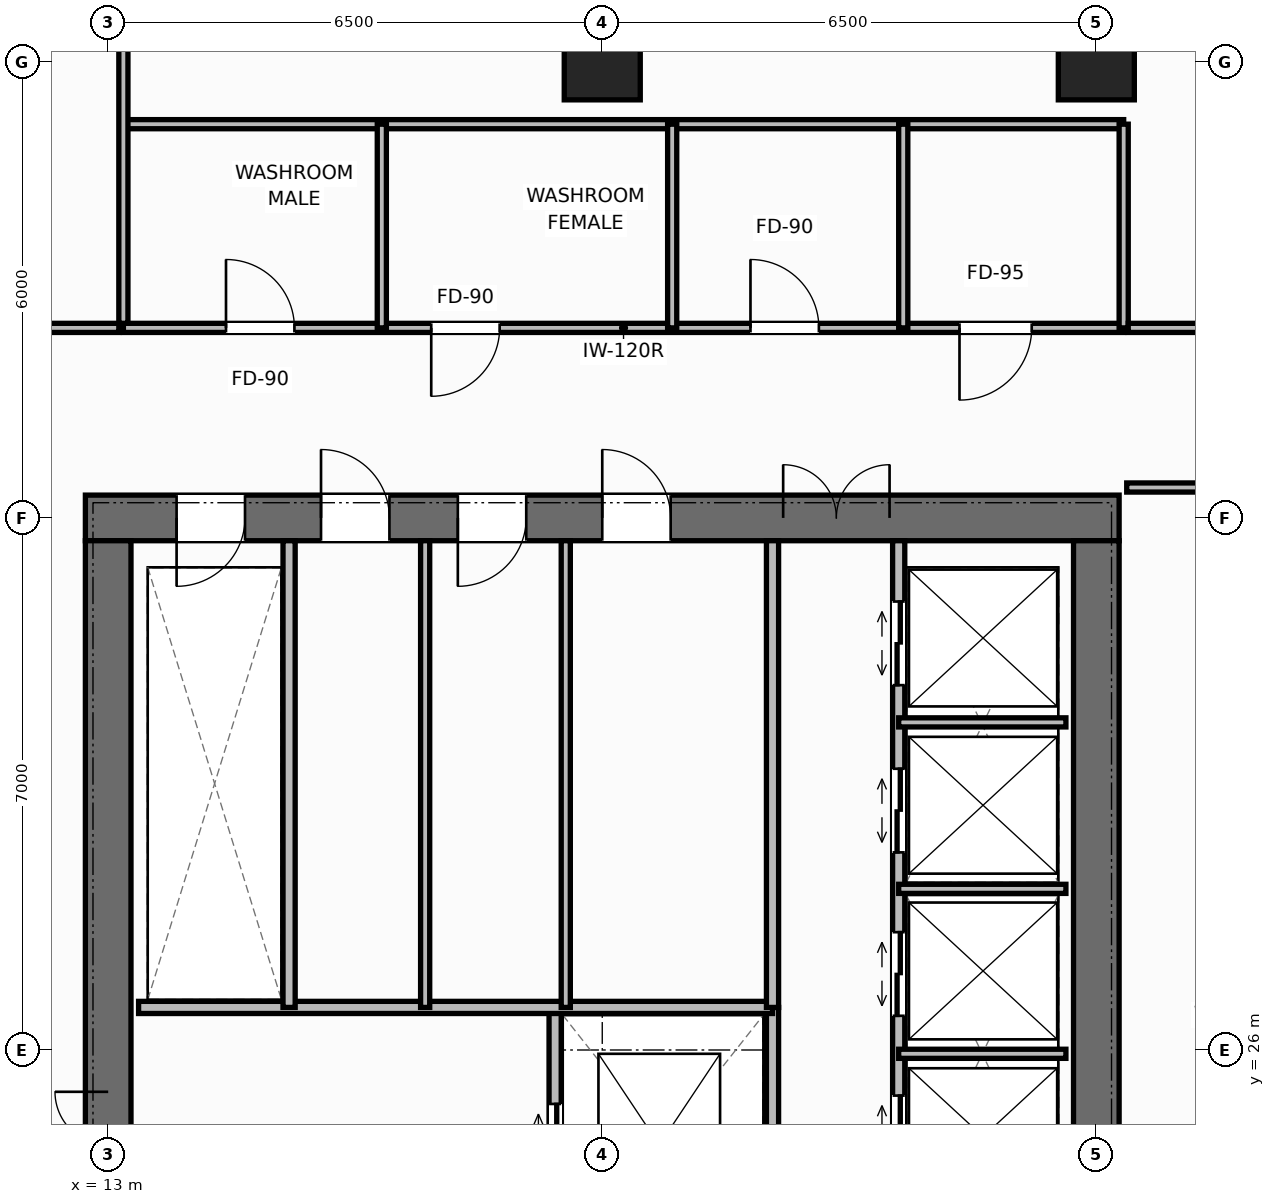
"""IFC4 building model, lengths in metres.
Left out: names, types, materials, properties, quantities, classifications, styles, units other than length and angle.
Written with IfcOpenShell. Run it as: python <this file> out.ifc"""

import sys

from ifc_helpers import new_model, si_unit, direction, frame, frame_2d, origin, origin_2d, place, context, subcontext, project, spatial, rectangle, extrude, element, fill, save


model = new_model("IFC4")
c1 = context("Model", 3, precision=1e-05, world=origin(), true_north=direction((0.0, 1.0)))
c2 = subcontext(c1, "Body", "Model", "MODEL_VIEW")
j1 = project(units=[si_unit("LENGTHUNIT", "METRE"), si_unit("PLANEANGLEUNIT", "RADIAN")], contexts=[c1])
p1 = place(None, origin())
s1 = spatial("IfcSite", under=j1, at=p1, CompositionType="ELEMENT")
p2 = place(p1, origin())
s2 = spatial("IfcBuilding", under=s1, at=p2, CompositionType="ELEMENT")
p3 = place(p2, frame((0.0, 0.0, 144.2)))
s3 = spatial("IfcBuildingStorey", under=s2, at=p3, CompositionType="ELEMENT", Elevation=144.2)
p4 = place(p3, frame((12.7, 33.0, 0.0), z_axis=(0.0, 0.0, 1.0), x_axis=(1.0, 0.0, 0.0)))
e1 = element("IfcWall", 1, at=p4, inside=s3, PredefinedType="SHEAR", context=c2, shape_type="SweptSolid", body=[
    extrude(rectangle(XDim=13.6, YDim=0.6, at=frame_2d((6.8, 0.0))), origin(), (0.0, 0.0, 1.0), 3.8),
])
p5 = place(p4, frame((1.2, 0.0, 0.0)))
e2 = element("IfcOpeningElement", 2, at=p5, cuts=e1, PredefinedType="OPENING", context=c2, shape_type="SweptSolid", body=[
    extrude(rectangle(XDim=0.9, YDim=2.15, at=frame_2d((0.45, 1.075))), frame((0.0, 0.31, 0.0), z_axis=(0.0, -1.0, 0.0), x_axis=(1.0, 0.0, 0.0)), (0.0, 0.0, 1.0), 0.62),
])
p6 = place(p4, frame((3.1, 0.0, 0.0)))
e3 = element("IfcOpeningElement", 3, at=p6, cuts=e1, PredefinedType="OPENING", context=c2, shape_type="SweptSolid", body=[
    extrude(rectangle(XDim=0.9, YDim=2.15, at=frame_2d((0.45, 1.075))), frame((0.0, 0.31, 0.0), z_axis=(0.0, -1.0, 0.0), x_axis=(1.0, 0.0, 0.0)), (0.0, 0.0, 1.0), 0.62),
])
p7 = place(p4, frame((4.9, 0.0, 0.0)))
e4 = element("IfcOpeningElement", 4, at=p7, cuts=e1, PredefinedType="OPENING", context=c2, shape_type="SweptSolid", body=[
    extrude(rectangle(XDim=0.9, YDim=2.15, at=frame_2d((0.45, 1.075))), frame((0.0, 0.31, 0.0), z_axis=(0.0, -1.0, 0.0), x_axis=(1.0, 0.0, 0.0)), (0.0, 0.0, 1.0), 0.62),
])
p8 = place(p4, frame((6.8, 0.0, 0.0)))
e5 = element("IfcOpeningElement", 5, at=p8, cuts=e1, PredefinedType="OPENING", context=c2, shape_type="SweptSolid", body=[
    extrude(rectangle(XDim=0.9, YDim=2.15, at=frame_2d((0.45, 1.075))), frame((0.0, 0.31, 0.0), z_axis=(0.0, -1.0, 0.0), x_axis=(1.0, 0.0, 0.0)), (0.0, 0.0, 1.0), 0.62),
])
p9 = place(p4, frame((9.18, 0.0, 0.0)))
e6 = element("IfcOpeningElement", 6, at=p9, cuts=e1, PredefinedType="OPENING", context=c2, shape_type="SweptSolid", body=[
    extrude(rectangle(XDim=1.4, YDim=2.2, at=frame_2d((0.7, 1.1))), frame((0.0, 0.31, 0.0), z_axis=(0.0, -1.0, 0.0), x_axis=(1.0, 0.0, 0.0)), (0.0, 0.0, 1.0), 0.62),
])
p10 = place(p3, frame((13.0, 19.3, 0.0), z_axis=(0.0, 0.0, 1.0), x_axis=(0.0, 1.0, 0.0)))
e7 = element("IfcWall", 7, at=p10, inside=s3, PredefinedType="SHEAR", context=c2, shape_type="SweptSolid", body=[
    extrude(rectangle(XDim=13.4, YDim=0.6, at=frame_2d((6.7, 0.0))), origin(), (0.0, 0.0, 1.0), 3.8),
])
p11 = place(p10, frame((4.75, 0.0, 0.0)))
e8 = element("IfcOpeningElement", 8, at=p11, cuts=e7, PredefinedType="OPENING", context=c2, shape_type="SweptSolid", body=[
    extrude(rectangle(XDim=1.4, YDim=2.2, at=frame_2d((0.7, 1.1))), frame((0.0, 0.31, 0.0), z_axis=(0.0, -1.0, 0.0), x_axis=(1.0, 0.0, 0.0)), (0.0, 0.0, 1.0), 0.62),
])
p12 = place(p3, frame((26.0, 19.3, 0.0), z_axis=(0.0, 0.0, 1.0), x_axis=(0.0, 1.0, 0.0)))
e9 = element("IfcWall", 9, at=p12, inside=s3, PredefinedType="SHEAR", context=c2, shape_type="SweptSolid", body=[
    extrude(rectangle(XDim=13.4, YDim=0.6, at=frame_2d((6.7, 0.0))), origin(), (0.0, 0.0, 1.0), 3.8),
])
for number, where, z_axis, x_axis in (
    (10, (19.5, 39.0, 0.0), (0.0, 0.0, 1.0), (1.0, 0.0, 0.0)),
    (11, (26.0, 39.0, 0.0), (0.0, 0.0, 1.0), (1.0, 0.0, 0.0)),
):
    element("IfcColumn", number, at=place(p3, frame(where, z_axis=z_axis, x_axis=x_axis)), inside=s3, PredefinedType="COLUMN", context=c2, shape_type="SweptSolid", body=[
        extrude(rectangle(XDim=1.0, YDim=1.0, at=origin_2d()), origin(), (0.0, 0.0, 1.0), 3.8),
    ])
p13 = place(p3, frame((21.74, 23.09, 0.0), z_axis=(0.0, 0.0, 1.0), x_axis=(0.0, 1.0, 0.0)))
e12 = element("IfcWall", 12, at=p13, inside=s3, PredefinedType="STANDARD", context=c2, shape_type="SweptSolid", body=[
    extrude(rectangle(XDim=3.47, YDim=0.16, at=frame_2d((1.735, 0.0))), origin(), (0.0, 0.0, 1.0), 3.572),
])
p14 = place(p3, frame((18.88, 23.09, 0.0), z_axis=(0.0, 0.0, 1.0), x_axis=(0.0, 1.0, 0.0)))
e13 = element("IfcWall", 13, at=p14, inside=s3, PredefinedType="STANDARD", context=c2, shape_type="SweptSolid", body=[
    extrude(rectangle(XDim=3.47, YDim=0.16, at=frame_2d((1.735, 0.0))), origin(), (0.0, 0.0, 1.0), 3.572),
])
p15 = place(p14, frame((1.1, 0.0, 0.0)))
e14 = element("IfcOpeningElement", 14, at=p15, cuts=e13, PredefinedType="OPENING", context=c2, shape_type="SweptSolid", body=[
    extrude(rectangle(XDim=1.1, YDim=2.2, at=frame_2d((0.55, 1.1))), frame((0.0, 0.09, 0.0), z_axis=(0.0, -1.0, 0.0), x_axis=(1.0, 0.0, 0.0)), (0.0, 0.0, 1.0), 0.18),
])
p16 = place(p3, frame((13.4, 26.56, 0.0), z_axis=(0.0, 0.0, 1.0), x_axis=(1.0, 0.0, 0.0)))
e15 = element("IfcWall", 15, at=p16, inside=s3, PredefinedType="STANDARD", context=c2, shape_type="SweptSolid", body=[
    extrude(rectangle(XDim=8.34, YDim=0.16, at=frame_2d((4.17, 0.0))), origin(), (0.0, 0.0, 1.0), 3.572),
])
p17 = place(p3, frame((15.38, 26.56, 0.0), z_axis=(0.0, 0.0, 1.0), x_axis=(0.0, 1.0, 0.0)))
e16 = element("IfcWall", 16, at=p17, inside=s3, PredefinedType="STANDARD", context=c2, shape_type="SweptSolid", body=[
    extrude(rectangle(XDim=6.14, YDim=0.16, at=frame_2d((3.07, 0.0))), origin(), (0.0, 0.0, 1.0), 3.572),
])
for number, where, z_axis, x_axis in (
    (17, (17.17, 26.56, 0.0), (0.0, 0.0, 1.0), (0.0, 1.0, 0.0)),
    (18, (19.02, 26.56, 0.0), (0.0, 0.0, 1.0), (0.0, 1.0, 0.0)),
):
    element("IfcWall", number, at=place(p3, frame(where, z_axis=z_axis, x_axis=x_axis)), inside=s3, PredefinedType="PARTITIONING", context=c2, shape_type="SweptSolid", body=[
        extrude(rectangle(XDim=6.14, YDim=0.12, at=frame_2d((3.07, 0.0))), origin(), (0.0, 0.0, 1.0), 3.572),
    ])
p18 = place(p3, frame((21.74, 26.56, 0.0), z_axis=(0.0, 0.0, 1.0), x_axis=(0.0, 1.0, 0.0)))
e19 = element("IfcWall", 19, at=p18, inside=s3, PredefinedType="STANDARD", context=c2, shape_type="SweptSolid", body=[
    extrude(rectangle(XDim=6.14, YDim=0.16, at=frame_2d((3.07, 0.0))), origin(), (0.0, 0.0, 1.0), 3.572),
])
p19 = place(p3, frame((23.4, 19.3, 0.0), z_axis=(0.0, 0.0, 1.0), x_axis=(0.0, 1.0, 0.0)))
e20 = element("IfcWall", 20, at=p19, inside=s3, PredefinedType="STANDARD", context=c2, shape_type="SweptSolid", body=[
    extrude(rectangle(XDim=13.4, YDim=0.16, at=frame_2d((6.7, 0.0))), origin(), (0.0, 0.0, 1.0), 3.572),
])
p20 = place(p19, frame((1.7, 0.0, 0.0)))
e21 = element("IfcOpeningElement", 21, at=p20, cuts=e20, PredefinedType="OPENING", context=c2, shape_type="SweptSolid", body=[
    extrude(rectangle(XDim=0.95, YDim=2.15, at=frame_2d((0.475, 1.075))), frame((0.0, 0.09, 0.0), z_axis=(0.0, -1.0, 0.0), x_axis=(1.0, 0.0, 0.0)), (0.0, 0.0, 1.0), 0.18),
])
p21 = place(p19, frame((5.0, 0.0, 0.0)))
e22 = element("IfcOpeningElement", 22, at=p21, cuts=e20, PredefinedType="OPENING", context=c2, shape_type="SweptSolid", body=[
    extrude(rectangle(XDim=1.1, YDim=2.2, at=frame_2d((0.55, 1.1))), frame((0.0, 0.09, 0.0), z_axis=(0.0, -1.0, 0.0), x_axis=(1.0, 0.0, 0.0)), (0.0, 0.0, 1.0), 0.18),
])
p22 = place(p19, frame((7.15, 0.0, 0.0)))
e23 = element("IfcOpeningElement", 23, at=p22, cuts=e20, PredefinedType="OPENING", context=c2, shape_type="SweptSolid", body=[
    extrude(rectangle(XDim=1.1, YDim=2.2, at=frame_2d((0.55, 1.1))), frame((0.0, 0.09, 0.0), z_axis=(0.0, -1.0, 0.0), x_axis=(1.0, 0.0, 0.0)), (0.0, 0.0, 1.0), 0.18),
])
p23 = place(p19, frame((9.3, 0.0, 0.0)))
e24 = element("IfcOpeningElement", 24, at=p23, cuts=e20, PredefinedType="OPENING", context=c2, shape_type="SweptSolid", body=[
    extrude(rectangle(XDim=1.1, YDim=2.2, at=frame_2d((0.55, 1.1))), frame((0.0, 0.09, 0.0), z_axis=(0.0, -1.0, 0.0), x_axis=(1.0, 0.0, 0.0)), (0.0, 0.0, 1.0), 0.18),
])
p24 = place(p19, frame((11.5, 0.0, 0.0)))
e25 = element("IfcOpeningElement", 25, at=p24, cuts=e20, PredefinedType="OPENING", context=c2, shape_type="SweptSolid", body=[
    extrude(rectangle(XDim=1.1, YDim=2.2, at=frame_2d((0.55, 1.1))), frame((0.0, 0.09, 0.0), z_axis=(0.0, -1.0, 0.0), x_axis=(1.0, 0.0, 0.0)), (0.0, 0.0, 1.0), 0.18),
])
for number, where, z_axis, x_axis in (
    (26, (23.4, 25.95, 0.0), (0.0, 0.0, 1.0), (1.0, 0.0, 0.0)),
    (27, (23.4, 28.12, 0.0), (0.0, 0.0, 1.0), (1.0, 0.0, 0.0)),
    (28, (23.4, 30.31, 0.0), (0.0, 0.0, 1.0), (1.0, 0.0, 0.0)),
):
    element("IfcWall", number, at=place(p3, frame(where, z_axis=z_axis, x_axis=x_axis)), inside=s3, PredefinedType="PARTITIONING", context=c2, shape_type="SweptSolid", body=[
        extrude(rectangle(XDim=2.2, YDim=0.12, at=frame_2d((1.1, 0.0))), origin(), (0.0, 0.0, 1.0), 3.572),
    ])
p25 = place(p3, frame((26.4, 33.4, 0.0), z_axis=(0.0, 0.0, 1.0), x_axis=(1.0, 0.0, 0.0)))
e29 = element("IfcWall", 29, at=p25, inside=s3, PredefinedType="PARTITIONING", context=c2, shape_type="SweptSolid", body=[
    extrude(rectangle(XDim=3.6, YDim=0.12, at=frame_2d((1.8, 0.0))), origin(), (0.0, 0.0, 1.0), 3.572),
])
p26 = place(p25, frame((1.1, 0.0, 0.0)))
e30 = element("IfcOpeningElement", 30, at=p26, cuts=e29, PredefinedType="OPENING", context=c2, shape_type="SweptSolid", body=[
    extrude(rectangle(XDim=0.95, YDim=2.15, at=frame_2d((0.475, 1.075))), frame((0.0, 0.07, 0.0), z_axis=(0.0, -1.0, 0.0), x_axis=(1.0, 0.0, 0.0)), (0.0, 0.0, 1.0), 0.14),
])
p27 = place(p3, frame((13.2, 35.5, 0.0), z_axis=(0.0, 0.0, 1.0), x_axis=(1.0, 0.0, 0.0)))
e31 = element("IfcWall", 31, at=p27, inside=s3, PredefinedType="PARTITIONING", context=c2, shape_type="SweptSolid", body=[
    extrude(rectangle(XDim=13.16, YDim=0.12, at=frame_2d((6.58, 0.0))), origin(), (0.0, 0.0, 1.0), 3.572),
])
p28 = place(p27, frame((1.35, 0.0, 0.0)))
e32 = element("IfcOpeningElement", 32, at=p28, cuts=e31, PredefinedType="OPENING", context=c2, shape_type="SweptSolid", body=[
    extrude(rectangle(XDim=0.9, YDim=2.15, at=frame_2d((0.45, 1.075))), frame((0.0, 0.07, 0.0), z_axis=(0.0, -1.0, 0.0), x_axis=(1.0, 0.0, 0.0)), (0.0, 0.0, 1.0), 0.14),
])
p29 = place(p27, frame((4.05, 0.0, 0.0)))
e33 = element("IfcOpeningElement", 33, at=p29, cuts=e31, PredefinedType="OPENING", context=c2, shape_type="SweptSolid", body=[
    extrude(rectangle(XDim=0.9, YDim=2.15, at=frame_2d((0.45, 1.075))), frame((0.0, 0.07, 0.0), z_axis=(0.0, -1.0, 0.0), x_axis=(1.0, 0.0, 0.0)), (0.0, 0.0, 1.0), 0.14),
])
p30 = place(p27, frame((8.25, 0.0, 0.0)))
e34 = element("IfcOpeningElement", 34, at=p30, cuts=e31, PredefinedType="OPENING", context=c2, shape_type="SweptSolid", body=[
    extrude(rectangle(XDim=0.9, YDim=2.15, at=frame_2d((0.45, 1.075))), frame((0.0, 0.07, 0.0), z_axis=(0.0, -1.0, 0.0), x_axis=(1.0, 0.0, 0.0)), (0.0, 0.0, 1.0), 0.14),
])
p31 = place(p27, frame((11.0, 0.0, 0.0)))
e35 = element("IfcOpeningElement", 35, at=p31, cuts=e31, PredefinedType="OPENING", context=c2, shape_type="SweptSolid", body=[
    extrude(rectangle(XDim=0.95, YDim=2.15, at=frame_2d((0.475, 1.075))), frame((0.0, 0.07, 0.0), z_axis=(0.0, -1.0, 0.0), x_axis=(1.0, 0.0, 0.0)), (0.0, 0.0, 1.0), 0.14),
])
p32 = place(p3, frame((13.2, 38.18, 0.0), z_axis=(0.0, 0.0, 1.0), x_axis=(1.0, 0.0, 0.0)))
e36 = element("IfcWall", 36, at=p32, inside=s3, PredefinedType="PARTITIONING", context=c2, shape_type="SweptSolid", body=[
    extrude(rectangle(XDim=13.16, YDim=0.12, at=frame_2d((6.58, 0.0))), origin(), (0.0, 0.0, 1.0), 3.572),
])
for number, where, z_axis, x_axis in (
    (37, (16.6, 35.5, 0.0), (0.0, 0.0, 1.0), (0.0, 1.0, 0.0)),
    (38, (20.42, 35.5, 0.0), (0.0, 0.0, 1.0), (0.0, 1.0, 0.0)),
    (39, (23.46, 35.5, 0.0), (0.0, 0.0, 1.0), (0.0, 1.0, 0.0)),
    (40, (26.36, 35.5, 0.0), (0.0, 0.0, 1.0), (0.0, 1.0, 0.0)),
):
    element("IfcWall", number, at=place(p3, frame(where, z_axis=z_axis, x_axis=x_axis)), inside=s3, PredefinedType="PARTITIONING", context=c2, shape_type="SweptSolid", body=[
        extrude(rectangle(XDim=2.68, YDim=0.12, at=frame_2d((1.34, 0.0))), origin(), (0.0, 0.0, 1.0), 3.572),
    ])
p33 = place(p3, frame((13.2, 35.56, 0.0), z_axis=(0.0, 0.0, 1.0), x_axis=(0.0, 1.0, 0.0)))
e41 = element("IfcWall", 41, at=p33, inside=s3, PredefinedType="PARTITIONING", context=c2, shape_type="SweptSolid", body=[
    extrude(rectangle(XDim=13.02, YDim=0.12, at=frame_2d((6.51, 0.0))), origin(), (0.0, 0.0, 1.0), 3.022),
])
p34 = place(p3, frame((3.98, 35.5, 0.0), z_axis=(0.0, 0.0, 1.0), x_axis=(1.0, 0.0, 0.0)))
e42 = element("IfcWall", 42, at=p34, inside=s3, PredefinedType="PARTITIONING", context=c2, shape_type="SweptSolid", body=[
    extrude(rectangle(XDim=9.16, YDim=0.12, at=frame_2d((4.58, 0.0))), origin(), (0.0, 0.0, 1.0), 3.572),
])
p35 = place(p34, frame((6.9, 0.0, 0.0)))
e43 = element("IfcOpeningElement", 43, at=p35, cuts=e42, PredefinedType="OPENING", context=c2, shape_type="SweptSolid", body=[
    extrude(rectangle(XDim=0.95, YDim=2.15, at=frame_2d((0.475, 1.075))), frame((0.0, 0.07, 0.0), z_axis=(0.0, -1.0, 0.0), x_axis=(1.0, 0.0, 0.0)), (0.0, 0.0, 1.0), 0.14),
])
p36 = place(p3, frame((26.42, 35.5, 0.0), z_axis=(0.0, 0.0, 1.0), x_axis=(1.0, 0.0, 0.0)))
e44 = element("IfcWall", 44, at=p36, inside=s3, PredefinedType="PARTITIONING", context=c2, shape_type="SweptSolid", body=[
    extrude(rectangle(XDim=12.72, YDim=0.12, at=frame_2d((6.36, 0.0))), origin(), (0.0, 0.0, 1.0), 3.572),
])
p37 = place(p36, frame((7.954, 0.0, 0.0)))
e45 = element("IfcOpeningElement", 45, at=p37, cuts=e44, PredefinedType="OPENING", context=c2, shape_type="SweptSolid", body=[
    extrude(rectangle(XDim=0.95, YDim=2.15, at=frame_2d((0.475, 1.075))), frame((0.0, 0.07, 0.0), z_axis=(0.0, -1.0, 0.0), x_axis=(1.0, 0.0, 0.0)), (0.0, 0.0, 1.0), 0.14),
])
p38 = place(p11, origin())
e46 = element("IfcDoor", 46, at=p38, inside=s3, OperationType="DOUBLE_DOOR_SINGLE_SWING", PredefinedType="DOOR", context=c2, shape_type="SweptSolid", body=[
    extrude(rectangle(XDim=1.4, YDim=2.2, at=frame_2d((0.7, 1.1))), frame((0.0, 0.025, 0.0), z_axis=(0.0, -1.0, 0.0), x_axis=(1.0, 0.0, 0.0)), (0.0, 0.0, 1.0), 0.05),
])
fill(e8, e46)
p39 = place(p15, origin())
e47 = element("IfcDoor", 47, at=p39, inside=s3, OperationType="DOUBLE_DOOR_SLIDING", PredefinedType="DOOR", context=c2, shape_type="SweptSolid", body=[
    extrude(rectangle(XDim=1.1, YDim=2.2, at=frame_2d((0.55, 1.1))), frame((0.0, 0.025, 0.0), z_axis=(0.0, -1.0, 0.0), x_axis=(1.0, 0.0, 0.0)), (0.0, 0.0, 1.0), 0.05),
])
fill(e14, e47)
p40 = place(p5, origin())
e48 = element("IfcDoor", 48, at=p40, inside=s3, OperationType="SINGLE_SWING_RIGHT", PredefinedType="DOOR", context=c2, shape_type="SweptSolid", body=[
    extrude(rectangle(XDim=0.9, YDim=2.15, at=frame_2d((0.45, 1.075))), frame((0.0, -0.025, 0.0), z_axis=(0.0, -1.0, 0.0), x_axis=(1.0, 0.0, 0.0)), (0.0, 0.0, 1.0), 0.05),
])
fill(e2, e48)
p41 = place(p6, origin())
e49 = element("IfcDoor", 49, at=p41, inside=s3, OperationType="SINGLE_SWING_LEFT", PredefinedType="DOOR", context=c2, shape_type="SweptSolid", body=[
    extrude(rectangle(XDim=0.9, YDim=2.15, at=frame_2d((0.45, 1.075))), frame((0.0, -0.025, 0.0), z_axis=(0.0, -1.0, 0.0), x_axis=(1.0, 0.0, 0.0)), (0.0, 0.0, 1.0), 0.05),
])
fill(e3, e49)
p42 = place(p7, origin())
e50 = element("IfcDoor", 50, at=p42, inside=s3, OperationType="SINGLE_SWING_RIGHT", PredefinedType="DOOR", context=c2, shape_type="SweptSolid", body=[
    extrude(rectangle(XDim=0.9, YDim=2.15, at=frame_2d((0.45, 1.075))), frame((0.0, -0.025, 0.0), z_axis=(0.0, -1.0, 0.0), x_axis=(1.0, 0.0, 0.0)), (0.0, 0.0, 1.0), 0.05),
])
fill(e4, e50)
p43 = place(p8, origin())
e51 = element("IfcDoor", 51, at=p43, inside=s3, OperationType="SINGLE_SWING_LEFT", PredefinedType="DOOR", context=c2, shape_type="SweptSolid", body=[
    extrude(rectangle(XDim=0.9, YDim=2.15, at=frame_2d((0.45, 1.075))), frame((0.0, -0.025, 0.0), z_axis=(0.0, -1.0, 0.0), x_axis=(1.0, 0.0, 0.0)), (0.0, 0.0, 1.0), 0.05),
])
fill(e5, e51)
p44 = place(p9, origin())
e52 = element("IfcDoor", 52, at=p44, inside=s3, OperationType="DOUBLE_DOOR_SINGLE_SWING", PredefinedType="DOOR", context=c2, shape_type="SweptSolid", body=[
    extrude(rectangle(XDim=1.4, YDim=2.2, at=frame_2d((0.7, 1.1))), frame((0.0, -0.025, 0.0), z_axis=(0.0, -1.0, 0.0), x_axis=(1.0, 0.0, 0.0)), (0.0, 0.0, 1.0), 0.05),
])
fill(e6, e52)
p45 = place(p21, origin())
e53 = element("IfcDoor", 53, at=p45, inside=s3, OperationType="DOUBLE_DOOR_SLIDING", PredefinedType="DOOR", context=c2, shape_type="SweptSolid", body=[
    extrude(rectangle(XDim=1.1, YDim=2.2, at=frame_2d((0.55, 1.1))), frame((0.0, 0.025, 0.0), z_axis=(0.0, -1.0, 0.0), x_axis=(1.0, 0.0, 0.0)), (0.0, 0.0, 1.0), 0.05),
])
fill(e22, e53)
p46 = place(p22, origin())
e54 = element("IfcDoor", 54, at=p46, inside=s3, OperationType="DOUBLE_DOOR_SLIDING", PredefinedType="DOOR", context=c2, shape_type="SweptSolid", body=[
    extrude(rectangle(XDim=1.1, YDim=2.2, at=frame_2d((0.55, 1.1))), frame((0.0, 0.025, 0.0), z_axis=(0.0, -1.0, 0.0), x_axis=(1.0, 0.0, 0.0)), (0.0, 0.0, 1.0), 0.05),
])
fill(e23, e54)
p47 = place(p23, origin())
e55 = element("IfcDoor", 55, at=p47, inside=s3, OperationType="DOUBLE_DOOR_SLIDING", PredefinedType="DOOR", context=c2, shape_type="SweptSolid", body=[
    extrude(rectangle(XDim=1.1, YDim=2.2, at=frame_2d((0.55, 1.1))), frame((0.0, 0.025, 0.0), z_axis=(0.0, -1.0, 0.0), x_axis=(1.0, 0.0, 0.0)), (0.0, 0.0, 1.0), 0.05),
])
fill(e24, e55)
p48 = place(p24, origin())
e56 = element("IfcDoor", 56, at=p48, inside=s3, OperationType="DOUBLE_DOOR_SLIDING", PredefinedType="DOOR", context=c2, shape_type="SweptSolid", body=[
    extrude(rectangle(XDim=1.1, YDim=2.2, at=frame_2d((0.55, 1.1))), frame((0.0, 0.025, 0.0), z_axis=(0.0, -1.0, 0.0), x_axis=(1.0, 0.0, 0.0)), (0.0, 0.0, 1.0), 0.05),
])
fill(e25, e56)
p49 = place(p28, origin())
e57 = element("IfcDoor", 57, at=p49, inside=s3, OperationType="SINGLE_SWING_LEFT", PredefinedType="DOOR", context=c2, shape_type="SweptSolid", body=[
    extrude(rectangle(XDim=0.9, YDim=2.15, at=frame_2d((0.45, 1.075))), frame((0.0, 0.025, 0.0), z_axis=(0.0, -1.0, 0.0), x_axis=(1.0, 0.0, 0.0)), (0.0, 0.0, 1.0), 0.05),
])
fill(e32, e57)
p50 = place(p29, origin())
e58 = element("IfcDoor", 58, at=p50, inside=s3, OperationType="SINGLE_SWING_RIGHT", PredefinedType="DOOR", context=c2, shape_type="SweptSolid", body=[
    extrude(rectangle(XDim=0.9, YDim=2.15, at=frame_2d((0.45, 1.075))), frame((0.0, 0.025, 0.0), z_axis=(0.0, -1.0, 0.0), x_axis=(1.0, 0.0, 0.0)), (0.0, 0.0, 1.0), 0.05),
])
fill(e33, e58)
p51 = place(p30, origin())
e59 = element("IfcDoor", 59, at=p51, inside=s3, OperationType="SINGLE_SWING_LEFT", PredefinedType="DOOR", context=c2, shape_type="SweptSolid", body=[
    extrude(rectangle(XDim=0.9, YDim=2.15, at=frame_2d((0.45, 1.075))), frame((0.0, 0.025, 0.0), z_axis=(0.0, -1.0, 0.0), x_axis=(1.0, 0.0, 0.0)), (0.0, 0.0, 1.0), 0.05),
])
fill(e34, e59)
p52 = place(p31, origin())
e60 = element("IfcDoor", 60, at=p52, inside=s3, OperationType="SINGLE_SWING_RIGHT", PredefinedType="DOOR", context=c2, shape_type="SweptSolid", body=[
    extrude(rectangle(XDim=0.95, YDim=2.15, at=frame_2d((0.475, 1.075))), frame((0.0, 0.025, 0.0), z_axis=(0.0, -1.0, 0.0), x_axis=(1.0, 0.0, 0.0)), (0.0, 0.0, 1.0), 0.05),
])
fill(e35, e60)
save(model, sys.argv[1])
